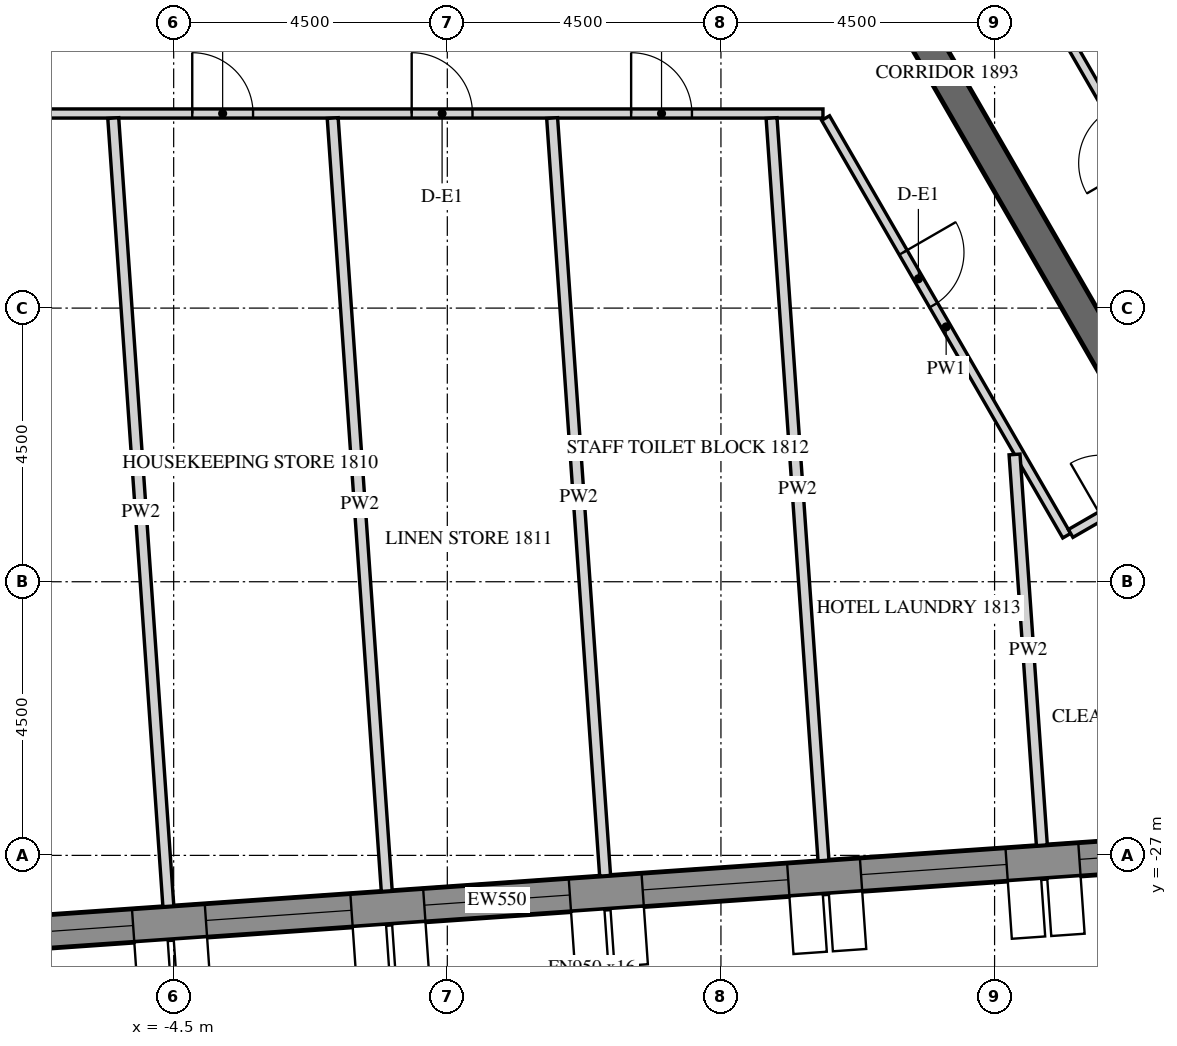
"""IFC4 building model, lengths in metres.
Left out: names, types, materials, properties, quantities, classifications, styles, units other than length and angle.
Written with IfcOpenShell. Run it as: python <this file> out.ifc"""

import sys

from ifc_helpers import new_model, si_unit, direction, frame, frame_2d, origin, place, context, subcontext, project, spatial, polyline, rectangle, outline, extrude, element, fill, save


model = new_model("IFC4")
c1 = context("Model", 3, precision=1e-05, world=origin(), true_north=direction((0.0, 1.0)))
c2 = subcontext(c1, "Body", "Model", "MODEL_VIEW")
j1 = project(units=[si_unit("LENGTHUNIT", "METRE"), si_unit("PLANEANGLEUNIT", "RADIAN")], contexts=[c1])
p1 = place(None, origin())
s1 = spatial("IfcSite", under=j1, at=p1, CompositionType="ELEMENT")
p2 = place(p1, origin())
s2 = spatial("IfcBuilding", under=s1, at=p2, CompositionType="ELEMENT")
p3 = place(p2, frame((0.0, 0.0, 226.8)))
s3 = spatial("IfcBuildingStorey", under=s2, at=p3, CompositionType="ELEMENT", Elevation=226.8)
p4 = place(p3, frame((-13.026, -28.704, -0.15), z_axis=(0.0, 0.0, 1.0), x_axis=(0.99756406806, 0.069756219185, 0.0)))
e1 = element("IfcWall", 1, at=p4, inside=s3, PredefinedType="SOLIDWALL", context=c2, shape_type="SweptSolid", body=[
    extrude(outline(polyline([(-0.026, -0.275), (27.78, -0.275), (27.735, 0.275), (0.026, 0.275), (-0.026, -0.275)])), origin(), (0.0, 0.0, 1.0), 3.9),
])
p5 = place(p4, frame((1.879, 0.0, 1.05)))
e2 = element("IfcOpeningElement", 2, at=p5, cuts=e1, PredefinedType="OPENING", context=c2, shape_type="SweptSolid", body=[
    extrude(rectangle(XDim=2.4, YDim=2.4, at=frame_2d((1.2, 1.2))), frame((0.0, 0.285, 0.0), z_axis=(0.0, -1.0, 0.0), x_axis=(1.0, 0.0, 0.0)), (0.0, 0.0, 1.0), 0.57),
])
p6 = place(p4, frame((5.479, 0.0, 1.05)))
e3 = element("IfcOpeningElement", 3, at=p6, cuts=e1, PredefinedType="OPENING", context=c2, shape_type="SweptSolid", body=[
    extrude(rectangle(XDim=2.4, YDim=2.4, at=frame_2d((1.2, 1.2))), frame((0.0, 0.285, 0.0), z_axis=(0.0, -1.0, 0.0), x_axis=(1.0, 0.0, 0.0)), (0.0, 0.0, 1.0), 0.57),
])
p7 = place(p4, frame((9.079, 0.0, 1.05)))
e4 = element("IfcOpeningElement", 4, at=p7, cuts=e1, PredefinedType="OPENING", context=c2, shape_type="SweptSolid", body=[
    extrude(rectangle(XDim=2.4, YDim=2.4, at=frame_2d((1.2, 1.2))), frame((0.0, 0.285, 0.0), z_axis=(0.0, -1.0, 0.0), x_axis=(1.0, 0.0, 0.0)), (0.0, 0.0, 1.0), 0.57),
])
p8 = place(p4, frame((12.679, 0.0, 1.05)))
e5 = element("IfcOpeningElement", 5, at=p8, cuts=e1, PredefinedType="OPENING", context=c2, shape_type="SweptSolid", body=[
    extrude(rectangle(XDim=2.4, YDim=2.4, at=frame_2d((1.2, 1.2))), frame((0.0, 0.285, 0.0), z_axis=(0.0, -1.0, 0.0), x_axis=(1.0, 0.0, 0.0)), (0.0, 0.0, 1.0), 0.57),
])
p9 = place(p4, frame((16.279, 0.0, 1.05)))
e6 = element("IfcOpeningElement", 6, at=p9, cuts=e1, PredefinedType="OPENING", context=c2, shape_type="SweptSolid", body=[
    extrude(rectangle(XDim=2.4, YDim=2.4, at=frame_2d((1.2, 1.2))), frame((0.0, 0.285, 0.0), z_axis=(0.0, -1.0, 0.0), x_axis=(1.0, 0.0, 0.0)), (0.0, 0.0, 1.0), 0.57),
])
p10 = place(p4, frame((19.879, 0.0, 1.05)))
e7 = element("IfcOpeningElement", 7, at=p10, cuts=e1, PredefinedType="OPENING", context=c2, shape_type="SweptSolid", body=[
    extrude(rectangle(XDim=2.4, YDim=2.4, at=frame_2d((1.2, 1.2))), frame((0.0, 0.285, 0.0), z_axis=(0.0, -1.0, 0.0), x_axis=(1.0, 0.0, 0.0)), (0.0, 0.0, 1.0), 0.57),
])
p11 = place(p4, frame((23.479, 0.0, 1.05)))
e8 = element("IfcOpeningElement", 8, at=p11, cuts=e1, PredefinedType="OPENING", context=c2, shape_type="SweptSolid", body=[
    extrude(rectangle(XDim=2.4, YDim=2.4, at=frame_2d((1.2, 1.2))), frame((0.0, 0.285, 0.0), z_axis=(0.0, -1.0, 0.0), x_axis=(1.0, 0.0, 0.0)), (0.0, 0.0, 1.0), 0.57),
])
p12 = place(p3, frame((7.506, -13.0, -0.15), z_axis=(0.0, 0.0, 1.0), x_axis=(0.499988271576, -0.866032175087, 0.0)))
e9 = element("IfcWall", 9, at=p12, inside=s3, PredefinedType="SHEAR", context=c2, shape_type="SweptSolid", body=[
    extrude(rectangle(XDim=15.424, YDim=0.5, at=frame_2d((7.712, 0.0))), origin(), (0.0, 0.0, 1.0), 3.9),
])
p13 = place(p12, frame((6.812, 0.0, 0.15)))
e10 = element("IfcOpeningElement", 10, at=p13, cuts=e9, PredefinedType="OPENING", context=c2, shape_type="SweptSolid", body=[
    extrude(rectangle(XDim=1.8, YDim=2.4, at=frame_2d((0.9, 1.2))), frame((0.0, 0.26, 0.0), z_axis=(0.0, -1.0, 0.0), x_axis=(1.0, 0.0, 0.0)), (0.0, 0.0, 1.0), 0.52),
])
p14 = place(p3, frame((-8.458, -14.8, 0.0), z_axis=(0.0, 0.0, 1.0), x_axis=(1.0, 0.0, 0.0)))
e11 = element("IfcWall", 11, at=p14, inside=s3, PredefinedType="PARTITIONING", context=c2, shape_type="SweptSolid", body=[
    extrude(rectangle(XDim=14.636, YDim=0.15, at=frame_2d((7.318, 0.0))), origin(), (0.0, 0.0, 1.0), 2.988),
])
p15 = place(p14, frame((0.936, 0.0, 0.0)))
e12 = element("IfcOpeningElement", 12, at=p15, cuts=e11, PredefinedType="OPENING", context=c2, shape_type="SweptSolid", body=[
    extrude(rectangle(XDim=1.0, YDim=2.1, at=frame_2d((0.5, 1.05))), frame((0.0, 0.085, 0.0), z_axis=(0.0, -1.0, 0.0), x_axis=(1.0, 0.0, 0.0)), (0.0, 0.0, 1.0), 0.17),
])
p16 = place(p14, frame((4.264, 0.0, 0.0)))
e13 = element("IfcOpeningElement", 13, at=p16, cuts=e11, PredefinedType="OPENING", context=c2, shape_type="SweptSolid", body=[
    extrude(rectangle(XDim=1.0, YDim=2.1, at=frame_2d((0.5, 1.05))), frame((0.0, 0.085, 0.0), z_axis=(0.0, -1.0, 0.0), x_axis=(1.0, 0.0, 0.0)), (0.0, 0.0, 1.0), 0.17),
])
p17 = place(p14, frame((7.872, 0.0, 0.0)))
e14 = element("IfcOpeningElement", 14, at=p17, cuts=e11, PredefinedType="OPENING", context=c2, shape_type="SweptSolid", body=[
    extrude(rectangle(XDim=1.0, YDim=2.1, at=frame_2d((0.5, 1.05))), frame((0.0, 0.085, 0.0), z_axis=(0.0, -1.0, 0.0), x_axis=(1.0, 0.0, 0.0)), (0.0, 0.0, 1.0), 0.17),
])
p18 = place(p14, frame((11.481, 0.0, 0.0)))
e15 = element("IfcOpeningElement", 15, at=p18, cuts=e11, PredefinedType="OPENING", context=c2, shape_type="SweptSolid", body=[
    extrude(rectangle(XDim=1.0, YDim=2.1, at=frame_2d((0.5, 1.05))), frame((0.0, 0.085, 0.0), z_axis=(0.0, -1.0, 0.0), x_axis=(1.0, 0.0, 0.0)), (0.0, 0.0, 1.0), 0.17),
])
p19 = place(p3, frame((6.221, -14.875, 0.0), z_axis=(0.0, 0.0, 1.0), x_axis=(0.499989830942, -0.866031274813, 0.0)))
e16 = element("IfcWall", 16, at=p19, inside=s3, PredefinedType="PARTITIONING", context=c2, shape_type="SweptSolid", body=[
    extrude(rectangle(XDim=7.93, YDim=0.15, at=frame_2d((3.965, 0.0))), origin(), (0.0, 0.0, 1.0), 2.988),
])
p20 = place(p19, frame((2.552, 0.0, 0.0)))
e17 = element("IfcOpeningElement", 17, at=p20, cuts=e16, PredefinedType="OPENING", context=c2, shape_type="SweptSolid", body=[
    extrude(rectangle(XDim=1.0, YDim=2.1, at=frame_2d((0.5, 1.05))), frame((0.0, 0.085, 0.0), z_axis=(0.0, -1.0, 0.0), x_axis=(1.0, 0.0, 0.0)), (0.0, 0.0, 1.0), 0.17),
])
p21 = place(p3, frame((10.251, -21.705, 0.0), z_axis=(0.0, 0.0, 1.0), x_axis=(0.866013532718, 0.500020560727, 0.0)))
e18 = element("IfcWall", 18, at=p21, inside=s3, PredefinedType="PARTITIONING", context=c2, shape_type="SweptSolid", body=[
    extrude(rectangle(XDim=1.725, YDim=0.15, at=frame_2d((0.863, 0.0))), origin(), (0.0, 0.0, 1.0), 2.988),
])
p22 = place(p21, frame((0.575, 0.0, 0.0)))
e19 = element("IfcOpeningElement", 19, at=p22, cuts=e18, PredefinedType="OPENING", context=c2, shape_type="SweptSolid", body=[
    extrude(rectangle(XDim=1.0, YDim=2.1, at=frame_2d((0.5, 1.05))), frame((0.0, 0.085, 0.0), z_axis=(0.0, -1.0, 0.0), x_axis=(1.0, 0.0, 0.0)), (0.0, 0.0, 1.0), 0.17),
])
p23 = place(p3, frame((13.699, -19.628, 0.0), z_axis=(0.0, 0.0, 1.0), x_axis=(-0.499997422768, 0.866026891745, 0.0)))
e20 = element("IfcWall", 20, at=p23, inside=s3, PredefinedType="PARTITIONING", context=c2, shape_type="SweptSolid", body=[
    extrude(rectangle(XDim=7.942, YDim=0.15, at=frame_2d((3.971, 0.0))), origin(), (0.0, 0.0, 1.0), 2.988),
])
p24 = place(p23, frame((4.634, 0.0, 0.0)))
e21 = element("IfcOpeningElement", 21, at=p24, cuts=e20, PredefinedType="OPENING", context=c2, shape_type="SweptSolid", body=[
    extrude(rectangle(XDim=1.0, YDim=2.1, at=frame_2d((0.5, 1.05))), frame((0.0, 0.085, 0.0), z_axis=(0.0, -1.0, 0.0), x_axis=(1.0, 0.0, 0.0)), (0.0, 0.0, 1.0), 0.17),
])
p25 = place(p3, frame((-4.587, -27.838, 0.0), z_axis=(0.0, 0.0, 1.0), x_axis=(-0.069759577234, 0.997563833238, 0.0)))
e22 = element("IfcWall", 22, at=p25, inside=s3, PredefinedType="PARTITIONING", context=c2, shape_type="SweptSolid", body=[
    extrude(rectangle(XDim=12.995, YDim=0.18, at=frame_2d((6.497, 0.0))), origin(), (0.0, 0.0, 1.0), 2.988),
])
p26 = place(p3, frame((-0.996, -27.587, 0.0), z_axis=(0.0, 0.0, 1.0), x_axis=(-0.069758774678, 0.99756388936, 0.0)))
e23 = element("IfcWall", 23, at=p26, inside=s3, PredefinedType="PARTITIONING", context=c2, shape_type="SweptSolid", body=[
    extrude(rectangle(XDim=12.743, YDim=0.18, at=frame_2d((6.371, 0.0))), origin(), (0.0, 0.0, 1.0), 2.988),
])
p27 = place(p3, frame((2.595, -27.335, 0.0), z_axis=(0.0, 0.0, 1.0), x_axis=(-0.069757939761, 0.997563947745, 0.0)))
e24 = element("IfcWall", 24, at=p27, inside=s3, PredefinedType="PARTITIONING", context=c2, shape_type="SweptSolid", body=[
    extrude(rectangle(XDim=12.491, YDim=0.18, at=frame_2d((6.246, 0.0))), origin(), (0.0, 0.0, 1.0), 2.988),
])
p28 = place(p3, frame((6.187, -27.084, 0.0), z_axis=(0.0, 0.0, 1.0), x_axis=(-0.069755682409, 0.997564105595, 0.0)))
e25 = element("IfcWall", 25, at=p28, inside=s3, PredefinedType="PARTITIONING", context=c2, shape_type="SweptSolid", body=[
    extrude(rectangle(XDim=12.239, YDim=0.18, at=frame_2d((6.12, 0.0))), origin(), (0.0, 0.0, 1.0), 2.988),
])
p29 = place(p3, frame((9.778, -26.833, 0.0), z_axis=(0.0, 0.0, 1.0), x_axis=(-0.069733334443, 0.997565668048, 0.0)))
e26 = element("IfcWall", 26, at=p29, inside=s3, PredefinedType="PARTITIONING", context=c2, shape_type="SweptSolid", body=[
    extrude(rectangle(XDim=6.442, YDim=0.18, at=frame_2d((3.221, 0.0))), origin(), (0.0, 0.0, 1.0), 2.988),
])
p30 = place(p6, frame((0.0, 0.205, 0.0)))
e27 = element("IfcWindow", 27, at=p30, inside=s3, PartitioningType="DOUBLE_PANEL_VERTICAL", PredefinedType="WINDOW", context=c2, shape_type="SweptSolid", body=[
    extrude(rectangle(XDim=2.4, YDim=2.4, at=frame_2d((1.2, 1.2))), frame((0.0, 0.03, 0.0), z_axis=(0.0, -1.0, 0.0), x_axis=(1.0, 0.0, 0.0)), (0.0, 0.0, 1.0), 0.06),
])
fill(e3, e27)
p31 = place(p7, frame((0.0, 0.205, 0.0)))
e28 = element("IfcWindow", 28, at=p31, inside=s3, PartitioningType="DOUBLE_PANEL_VERTICAL", PredefinedType="WINDOW", context=c2, shape_type="SweptSolid", body=[
    extrude(rectangle(XDim=2.4, YDim=2.4, at=frame_2d((1.2, 1.2))), frame((0.0, 0.03, 0.0), z_axis=(0.0, -1.0, 0.0), x_axis=(1.0, 0.0, 0.0)), (0.0, 0.0, 1.0), 0.06),
])
fill(e4, e28)
p32 = place(p8, frame((0.0, 0.205, 0.0)))
e29 = element("IfcWindow", 29, at=p32, inside=s3, PartitioningType="DOUBLE_PANEL_VERTICAL", PredefinedType="WINDOW", context=c2, shape_type="SweptSolid", body=[
    extrude(rectangle(XDim=2.4, YDim=2.4, at=frame_2d((1.2, 1.2))), frame((0.0, 0.03, 0.0), z_axis=(0.0, -1.0, 0.0), x_axis=(1.0, 0.0, 0.0)), (0.0, 0.0, 1.0), 0.06),
])
fill(e5, e29)
p33 = place(p9, frame((0.0, 0.205, 0.0)))
e30 = element("IfcWindow", 30, at=p33, inside=s3, PartitioningType="DOUBLE_PANEL_VERTICAL", PredefinedType="WINDOW", context=c2, shape_type="SweptSolid", body=[
    extrude(rectangle(XDim=2.4, YDim=2.4, at=frame_2d((1.2, 1.2))), frame((0.0, 0.03, 0.0), z_axis=(0.0, -1.0, 0.0), x_axis=(1.0, 0.0, 0.0)), (0.0, 0.0, 1.0), 0.06),
])
fill(e6, e30)
p34 = place(p10, frame((0.0, 0.205, 0.0)))
e31 = element("IfcWindow", 31, at=p34, inside=s3, PartitioningType="DOUBLE_PANEL_VERTICAL", PredefinedType="WINDOW", context=c2, shape_type="SweptSolid", body=[
    extrude(rectangle(XDim=2.4, YDim=2.4, at=frame_2d((1.2, 1.2))), frame((0.0, 0.03, 0.0), z_axis=(0.0, -1.0, 0.0), x_axis=(1.0, 0.0, 0.0)), (0.0, 0.0, 1.0), 0.06),
])
fill(e7, e31)
p35 = place(p11, frame((0.0, 0.205, 0.0)))
e32 = element("IfcWindow", 32, at=p35, inside=s3, PartitioningType="DOUBLE_PANEL_VERTICAL", PredefinedType="WINDOW", context=c2, shape_type="SweptSolid", body=[
    extrude(rectangle(XDim=2.4, YDim=2.4, at=frame_2d((1.2, 1.2))), frame((0.0, 0.03, 0.0), z_axis=(0.0, -1.0, 0.0), x_axis=(1.0, 0.0, 0.0)), (0.0, 0.0, 1.0), 0.06),
])
fill(e8, e32)
p36 = place(p16, origin())
e33 = element("IfcDoor", 33, at=p36, inside=s3, OperationType="SINGLE_SWING_RIGHT", PredefinedType="DOOR", context=c2, shape_type="SweptSolid", body=[
    extrude(rectangle(XDim=1.0, YDim=2.1, at=frame_2d((0.5, 1.05))), frame((0.0, 0.025, 0.0), z_axis=(0.0, -1.0, 0.0), x_axis=(1.0, 0.0, 0.0)), (0.0, 0.0, 1.0), 0.05),
])
fill(e13, e33)
p37 = place(p17, origin())
e34 = element("IfcDoor", 34, at=p37, inside=s3, OperationType="SINGLE_SWING_RIGHT", PredefinedType="DOOR", context=c2, shape_type="SweptSolid", body=[
    extrude(rectangle(XDim=1.0, YDim=2.1, at=frame_2d((0.5, 1.05))), frame((0.0, 0.025, 0.0), z_axis=(0.0, -1.0, 0.0), x_axis=(1.0, 0.0, 0.0)), (0.0, 0.0, 1.0), 0.05),
])
fill(e14, e34)
p38 = place(p18, origin())
e35 = element("IfcDoor", 35, at=p38, inside=s3, OperationType="SINGLE_SWING_RIGHT", PredefinedType="DOOR", context=c2, shape_type="SweptSolid", body=[
    extrude(rectangle(XDim=1.0, YDim=2.1, at=frame_2d((0.5, 1.05))), frame((0.0, 0.025, 0.0), z_axis=(0.0, -1.0, 0.0), x_axis=(1.0, 0.0, 0.0)), (0.0, 0.0, 1.0), 0.05),
])
fill(e15, e35)
p39 = place(p20, origin())
e36 = element("IfcDoor", 36, at=p39, inside=s3, OperationType="SINGLE_SWING_RIGHT", PredefinedType="DOOR", context=c2, shape_type="SweptSolid", body=[
    extrude(rectangle(XDim=1.0, YDim=2.1, at=frame_2d((0.5, 1.05))), frame((0.0, 0.025, 0.0), z_axis=(0.0, -1.0, 0.0), x_axis=(1.0, 0.0, 0.0)), (0.0, 0.0, 1.0), 0.05),
])
fill(e17, e36)
save(model, sys.argv[1])
